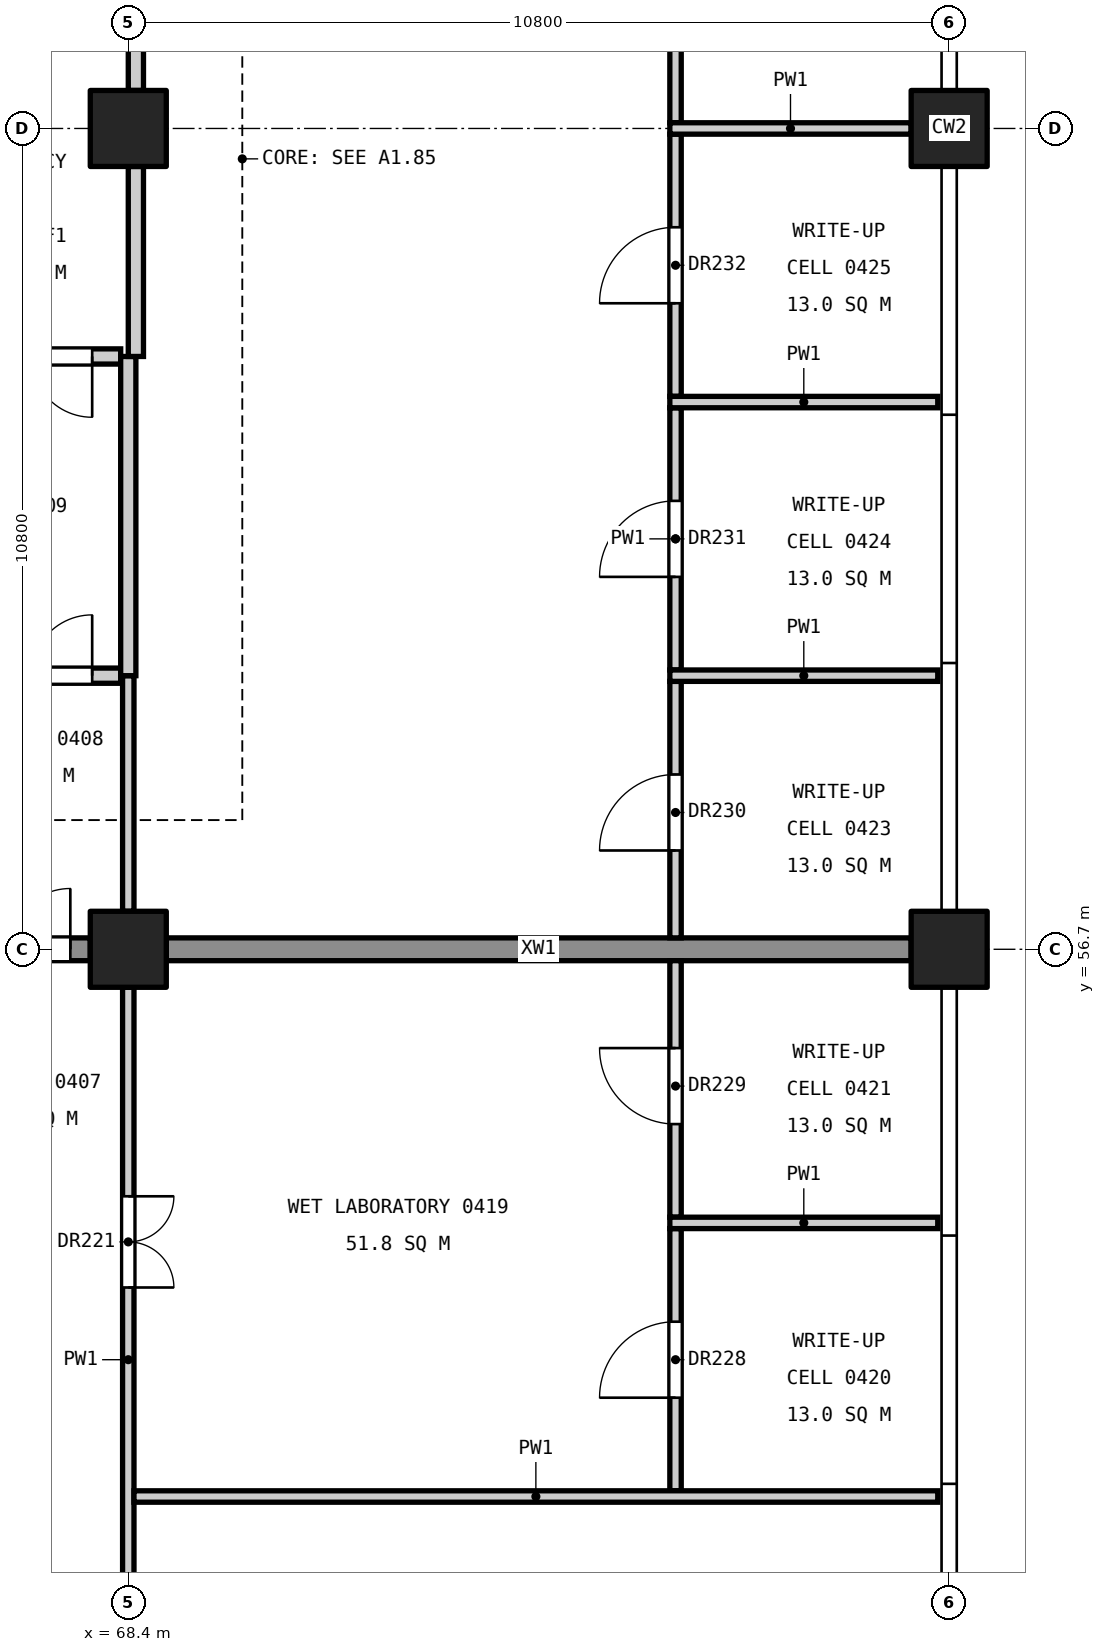
"""IFC4 building model, lengths in metres.
Left out: names, types, materials, properties, quantities, classifications, styles, units other than length and angle.
Written with IfcOpenShell. Run it as: python <this file> out.ifc"""

import sys

from ifc_helpers import new_model, si_unit, direction, frame, frame_2d, origin, origin_2d, place, context, subcontext, project, spatial, rectangle, extrude, element, fill, save


model = new_model("IFC4")
c1 = context("Model", 3, precision=1e-05, world=origin(), true_north=direction((0.0, 1.0)))
c2 = subcontext(c1, "Body", "Model", "MODEL_VIEW")
j1 = project(units=[si_unit("LENGTHUNIT", "METRE"), si_unit("PLANEANGLEUNIT", "RADIAN")], contexts=[c1])
p1 = place(None, origin())
s1 = spatial("IfcSite", under=j1, at=p1, CompositionType="ELEMENT")
p2 = place(p1, origin())
s2 = spatial("IfcBuilding", under=s1, at=p2, CompositionType="ELEMENT")
p3 = place(p2, frame((0.0, 0.0, 22.2)))
s3 = spatial("IfcBuildingStorey", under=s2, at=p3, CompositionType="ELEMENT", Elevation=22.2)
for number, where, z_axis, x_axis in (
    (1, (68.4, 56.7, 0.0), (0.0, 0.0, 1.0), (1.0, 0.0, 0.0)),
    (2, (68.4, 67.5, 0.0), (0.0, 0.0, 1.0), (1.0, 0.0, 0.0)),
    (3, (79.2, 56.7, 0.0), (0.0, 0.0, 1.0), (1.0, 0.0, 0.0)),
    (4, (79.2, 67.5, 0.0), (0.0, 0.0, 1.0), (1.0, 0.0, 0.0)),
):
    element("IfcColumn", number, at=place(p3, frame(where, z_axis=z_axis, x_axis=x_axis)), inside=s3, PredefinedType="COLUMN", context=c2, shape_type="SweptSolid", body=[
        extrude(rectangle(XDim=1.0, YDim=1.0, at=origin_2d()), origin(), (0.0, 0.0, 1.0), 4.8),
    ])
p4 = place(p3, frame((61.7, 56.7, 0.0), z_axis=(0.0, 0.0, 1.0), x_axis=(1.0, 0.0, 0.0)))
e5 = element("IfcWall", 5, at=p4, inside=s3, PredefinedType="SHEAR", context=c2, shape_type="SweptSolid", body=[
    extrude(rectangle(XDim=6.2, YDim=0.3, at=frame_2d((3.1, 0.0))), origin(), (0.0, 0.0, 1.0), 4.55),
])
p5 = place(p4, frame((4.337, 0.0, 0.0)))
e6 = element("IfcOpeningElement", 6, at=p5, cuts=e5, PredefinedType="OPENING", context=c2, shape_type="SweptSolid", body=[
    extrude(rectangle(XDim=1.6, YDim=2.1, at=frame_2d((0.8, 1.05))), frame((0.0, 0.16, 0.0), z_axis=(0.0, -1.0, 0.0), x_axis=(1.0, 0.0, 0.0)), (0.0, 0.0, 1.0), 0.32),
])
p6 = place(p3, frame((68.9, 56.7, 0.0), z_axis=(0.0, 0.0, 1.0), x_axis=(1.0, 0.0, 0.0)))
e7 = element("IfcWall", 7, at=p6, inside=s3, PredefinedType="SHEAR", context=c2, shape_type="SweptSolid", body=[
    extrude(rectangle(XDim=9.8, YDim=0.3, at=frame_2d((4.9, 0.0))), origin(), (0.0, 0.0, 1.0), 4.55),
])
p7 = place(p3, frame((65.95, 60.3, 0.0), z_axis=(0.0, 0.0, 1.0), x_axis=(1.0, 0.0, 0.0)))
e8 = element("IfcWall", 8, at=p7, inside=s3, PredefinedType="PARTITIONING", context=c2, shape_type="SweptSolid", body=[
    extrude(rectangle(XDim=2.35, YDim=0.2, at=frame_2d((1.175, 0.0))), origin(), (0.0, 0.0, 1.0), 3.85),
])
p8 = place(p7, frame((0.375, 0.0, 0.0)))
e9 = element("IfcOpeningElement", 9, at=p8, cuts=e8, PredefinedType="OPENING", context=c2, shape_type="SweptSolid", body=[
    extrude(rectangle(XDim=1.6, YDim=2.1, at=frame_2d((0.8, 1.05))), frame((0.0, 0.11, 0.0), z_axis=(0.0, -1.0, 0.0), x_axis=(1.0, 0.0, 0.0)), (0.0, 0.0, 1.0), 0.22),
])
p9 = place(p3, frame((65.95, 64.5, 0.0), z_axis=(0.0, 0.0, 1.0), x_axis=(1.0, 0.0, 0.0)))
e10 = element("IfcWall", 10, at=p9, inside=s3, PredefinedType="PARTITIONING", context=c2, shape_type="SweptSolid", body=[
    extrude(rectangle(XDim=2.35, YDim=0.2, at=frame_2d((1.175, 0.0))), origin(), (0.0, 0.0, 1.0), 3.55),
])
p10 = place(p9, frame((0.375, 0.0, 0.0)))
e11 = element("IfcOpeningElement", 11, at=p10, cuts=e10, PredefinedType="OPENING", context=c2, shape_type="SweptSolid", body=[
    extrude(rectangle(XDim=1.6, YDim=2.1, at=frame_2d((0.8, 1.05))), frame((0.0, 0.11, 0.0), z_axis=(0.0, -1.0, 0.0), x_axis=(1.0, 0.0, 0.0)), (0.0, 0.0, 1.0), 0.22),
])
p11 = place(p3, frame((68.4, 46.4, 0.0), z_axis=(0.0, 0.0, 1.0), x_axis=(0.0, 1.0, 0.0)))
e12 = element("IfcWall", 12, at=p11, inside=s3, PredefinedType="PARTITIONING", context=c2, shape_type="SweptSolid", body=[
    extrude(rectangle(XDim=9.8, YDim=0.15, at=frame_2d((4.9, 0.0))), origin(), (0.0, 0.0, 1.0), 3.55),
])
p12 = place(p11, frame((1.05, 0.0, 0.0)))
e13 = element("IfcOpeningElement", 13, at=p12, cuts=e12, PredefinedType="OPENING", context=c2, shape_type="SweptSolid", body=[
    extrude(rectangle(XDim=1.0, YDim=2.1, at=frame_2d((0.5, 1.05))), frame((0.0, 0.085, 0.0), z_axis=(0.0, -1.0, 0.0), x_axis=(1.0, 0.0, 0.0)), (0.0, 0.0, 1.0), 0.17),
])
p13 = place(p11, frame((5.85, 0.0, 0.0)))
e14 = element("IfcOpeningElement", 14, at=p13, cuts=e12, PredefinedType="OPENING", context=c2, shape_type="SweptSolid", body=[
    extrude(rectangle(XDim=1.2, YDim=2.1, at=frame_2d((0.6, 1.05))), frame((0.0, 0.085, 0.0), z_axis=(0.0, -1.0, 0.0), x_axis=(1.0, 0.0, 0.0)), (0.0, 0.0, 1.0), 0.17),
])
p14 = place(p3, frame((68.4, 57.2, 0.0), z_axis=(0.0, 0.0, 1.0), x_axis=(0.0, 1.0, 0.0)))
e15 = element("IfcWall", 15, at=p14, inside=s3, PredefinedType="PARTITIONING", context=c2, shape_type="SweptSolid", body=[
    extrude(rectangle(XDim=3.1, YDim=0.15, at=frame_2d((1.55, 0.0))), origin(), (0.0, 0.0, 1.0), 3.55),
])
p15 = place(p3, frame((68.4, 60.3, 0.0), z_axis=(0.0, 0.0, 1.0), x_axis=(0.0, 1.0, 0.0)))
e16 = element("IfcWall", 16, at=p15, inside=s3, PredefinedType="PARTITIONING", context=c2, shape_type="SweptSolid", body=[
    extrude(rectangle(XDim=4.2, YDim=0.2, at=frame_2d((2.1, 0.0))), origin(), (0.0, 0.0, 1.0), 3.55),
])
p16 = place(p3, frame((68.5, 64.5, 0.0), z_axis=(0.0, 0.0, 1.0), x_axis=(0.0, 1.0, 0.0)))
e17 = element("IfcWall", 17, at=p16, inside=s3, PredefinedType="PARTITIONING", context=c2, shape_type="SweptSolid", body=[
    extrude(rectangle(XDim=2.5, YDim=0.2, at=frame_2d((1.25, 0.0))), origin(), (0.0, 0.0, 1.0), 3.55),
])
p17 = place(p3, frame((68.5, 68.0, 0.0), z_axis=(0.0, 0.0, 1.0), x_axis=(0.0, 1.0, 0.0)))
e18 = element("IfcWall", 18, at=p17, inside=s3, PredefinedType="PARTITIONING", context=c2, shape_type="SweptSolid", body=[
    extrude(rectangle(XDim=2.8, YDim=0.2, at=frame_2d((1.4, 0.0))), origin(), (0.0, 0.0, 1.0), 3.55),
])
p18 = place(p3, frame((75.6, 49.575, 0.0), z_axis=(0.0, 0.0, 1.0), x_axis=(0.0, 1.0, 0.0)))
e19 = element("IfcWall", 19, at=p18, inside=s3, PredefinedType="PARTITIONING", context=c2, shape_type="SweptSolid", body=[
    extrude(rectangle(XDim=3.45, YDim=0.15, at=frame_2d((1.725, 0.0))), origin(), (0.0, 0.0, 1.0), 3.55),
])
p19 = place(p18, frame((1.225, 0.0, 0.0)))
e20 = element("IfcOpeningElement", 20, at=p19, cuts=e19, PredefinedType="OPENING", context=c2, shape_type="SweptSolid", body=[
    extrude(rectangle(XDim=1.0, YDim=2.1, at=frame_2d((0.5, 1.05))), frame((0.0, 0.085, 0.0), z_axis=(0.0, -1.0, 0.0), x_axis=(1.0, 0.0, 0.0)), (0.0, 0.0, 1.0), 0.17),
])
p20 = place(p3, frame((75.6, 53.175, 0.0), z_axis=(0.0, 0.0, 1.0), x_axis=(0.0, 1.0, 0.0)))
e21 = element("IfcWall", 21, at=p20, inside=s3, PredefinedType="PARTITIONING", context=c2, shape_type="SweptSolid", body=[
    extrude(rectangle(XDim=3.375, YDim=0.15, at=frame_2d((1.688, 0.0))), origin(), (0.0, 0.0, 1.0), 3.55),
])
p21 = place(p20, frame((1.225, 0.0, 0.0)))
e22 = element("IfcOpeningElement", 22, at=p21, cuts=e21, PredefinedType="OPENING", context=c2, shape_type="SweptSolid", body=[
    extrude(rectangle(XDim=1.0, YDim=2.1, at=frame_2d((0.5, 1.05))), frame((0.0, 0.085, 0.0), z_axis=(0.0, -1.0, 0.0), x_axis=(1.0, 0.0, 0.0)), (0.0, 0.0, 1.0), 0.17),
])
p22 = place(p3, frame((75.525, 53.1, 0.0), z_axis=(0.0, 0.0, 1.0), x_axis=(1.0, 0.0, 0.0)))
e23 = element("IfcWall", 23, at=p22, inside=s3, PredefinedType="PARTITIONING", context=c2, shape_type="SweptSolid", body=[
    extrude(rectangle(XDim=3.525, YDim=0.15, at=frame_2d((1.763, 0.0))), origin(), (0.0, 0.0, 1.0), 3.85),
])
p23 = place(p3, frame((75.6, 56.85, 0.0), z_axis=(0.0, 0.0, 1.0), x_axis=(0.0, 1.0, 0.0)))
e24 = element("IfcWall", 24, at=p23, inside=s3, PredefinedType="PARTITIONING", context=c2, shape_type="SweptSolid", body=[
    extrude(rectangle(XDim=3.375, YDim=0.15, at=frame_2d((1.688, 0.0))), origin(), (0.0, 0.0, 1.0), 3.55),
])
p24 = place(p23, frame((1.15, 0.0, 0.0)))
e25 = element("IfcOpeningElement", 25, at=p24, cuts=e24, PredefinedType="OPENING", context=c2, shape_type="SweptSolid", body=[
    extrude(rectangle(XDim=1.0, YDim=2.1, at=frame_2d((0.5, 1.05))), frame((0.0, 0.085, 0.0), z_axis=(0.0, -1.0, 0.0), x_axis=(1.0, 0.0, 0.0)), (0.0, 0.0, 1.0), 0.17),
])
p25 = place(p3, frame((75.6, 60.375, 0.0), z_axis=(0.0, 0.0, 1.0), x_axis=(0.0, 1.0, 0.0)))
e26 = element("IfcWall", 26, at=p25, inside=s3, PredefinedType="PARTITIONING", context=c2, shape_type="SweptSolid", body=[
    extrude(rectangle(XDim=3.45, YDim=0.15, at=frame_2d((1.725, 0.0))), origin(), (0.0, 0.0, 1.0), 3.55),
])
p26 = place(p25, frame((1.225, 0.0, 0.0)))
e27 = element("IfcOpeningElement", 27, at=p26, cuts=e26, PredefinedType="OPENING", context=c2, shape_type="SweptSolid", body=[
    extrude(rectangle(XDim=1.0, YDim=2.1, at=frame_2d((0.5, 1.05))), frame((0.0, 0.085, 0.0), z_axis=(0.0, -1.0, 0.0), x_axis=(1.0, 0.0, 0.0)), (0.0, 0.0, 1.0), 0.17),
])
p27 = place(p3, frame((75.6, 63.975, 0.0), z_axis=(0.0, 0.0, 1.0), x_axis=(0.0, 1.0, 0.0)))
e28 = element("IfcWall", 28, at=p27, inside=s3, PredefinedType="PARTITIONING", context=c2, shape_type="SweptSolid", body=[
    extrude(rectangle(XDim=3.45, YDim=0.15, at=frame_2d((1.725, 0.0))), origin(), (0.0, 0.0, 1.0), 3.55),
])
p28 = place(p27, frame((1.225, 0.0, 0.0)))
e29 = element("IfcOpeningElement", 29, at=p28, cuts=e28, PredefinedType="OPENING", context=c2, shape_type="SweptSolid", body=[
    extrude(rectangle(XDim=1.0, YDim=2.1, at=frame_2d((0.5, 1.05))), frame((0.0, 0.085, 0.0), z_axis=(0.0, -1.0, 0.0), x_axis=(1.0, 0.0, 0.0)), (0.0, 0.0, 1.0), 0.17),
])
p29 = place(p3, frame((75.6, 67.575, 0.0), z_axis=(0.0, 0.0, 1.0), x_axis=(0.0, 1.0, 0.0)))
e30 = element("IfcWall", 30, at=p29, inside=s3, PredefinedType="PARTITIONING", context=c2, shape_type="SweptSolid", body=[
    extrude(rectangle(XDim=3.45, YDim=0.15, at=frame_2d((1.725, 0.0))), origin(), (0.0, 0.0, 1.0), 3.55),
])
p30 = place(p29, frame((1.225, 0.0, 0.0)))
e31 = element("IfcOpeningElement", 31, at=p30, cuts=e30, PredefinedType="OPENING", context=c2, shape_type="SweptSolid", body=[
    extrude(rectangle(XDim=1.0, YDim=2.1, at=frame_2d((0.5, 1.05))), frame((0.0, 0.085, 0.0), z_axis=(0.0, -1.0, 0.0), x_axis=(1.0, 0.0, 0.0)), (0.0, 0.0, 1.0), 0.17),
])
for number, where, z_axis, x_axis in (
    (32, (75.525, 60.3, 0.0), (0.0, 0.0, 1.0), (1.0, 0.0, 0.0)),
    (33, (75.525, 63.9, 0.0), (0.0, 0.0, 1.0), (1.0, 0.0, 0.0)),
):
    element("IfcWall", number, at=place(p3, frame(where, z_axis=z_axis, x_axis=x_axis)), inside=s3, PredefinedType="PARTITIONING", context=c2, shape_type="SweptSolid", body=[
        extrude(rectangle(XDim=3.525, YDim=0.15, at=frame_2d((1.763, 0.0))), origin(), (0.0, 0.0, 1.0), 3.85),
    ])
p31 = place(p3, frame((75.525, 67.5, 0.0), z_axis=(0.0, 0.0, 1.0), x_axis=(1.0, 0.0, 0.0)))
e34 = element("IfcWall", 34, at=p31, inside=s3, PredefinedType="PARTITIONING", context=c2, shape_type="SweptSolid", body=[
    extrude(rectangle(XDim=3.175, YDim=0.15, at=frame_2d((1.587, 0.0))), origin(), (0.0, 0.0, 1.0), 3.85),
])
p32 = place(p3, frame((68.475, 49.5, 0.0), z_axis=(0.0, 0.0, 1.0), x_axis=(1.0, 0.0, 0.0)))
e35 = element("IfcWall", 35, at=p32, inside=s3, PredefinedType="PARTITIONING", context=c2, shape_type="SweptSolid", body=[
    extrude(rectangle(XDim=10.575, YDim=0.15, at=frame_2d((5.288, 0.0))), origin(), (0.0, 0.0, 1.0), 3.85),
])
p33 = place(p13, frame((1.2, 0.0, 0.0), z_axis=(0.0, 0.0, 1.0), x_axis=(-1.0, 0.0, 0.0)))
e36 = element("IfcDoor", 36, at=p33, inside=s3, OperationType="DOUBLE_DOOR_SINGLE_SWING", PredefinedType="DOOR", context=c2, shape_type="SweptSolid", body=[
    extrude(rectangle(XDim=1.2, YDim=2.1, at=frame_2d((0.6, 1.05))), frame((0.0, 0.025, 0.0), z_axis=(0.0, -1.0, 0.0), x_axis=(1.0, 0.0, 0.0)), (0.0, 0.0, 1.0), 0.05),
])
fill(e14, e36)
p34 = place(p19, origin())
e37 = element("IfcDoor", 37, at=p34, inside=s3, OperationType="SINGLE_SWING_LEFT", PredefinedType="DOOR", context=c2, shape_type="SweptSolid", body=[
    extrude(rectangle(XDim=1.0, YDim=2.1, at=frame_2d((0.5, 1.05))), frame((0.0, 0.025, 0.0), z_axis=(0.0, -1.0, 0.0), x_axis=(1.0, 0.0, 0.0)), (0.0, 0.0, 1.0), 0.05),
])
fill(e20, e37)
p35 = place(p21, origin())
e38 = element("IfcDoor", 38, at=p35, inside=s3, OperationType="SINGLE_SWING_RIGHT", PredefinedType="DOOR", context=c2, shape_type="SweptSolid", body=[
    extrude(rectangle(XDim=1.0, YDim=2.1, at=frame_2d((0.5, 1.05))), frame((0.0, 0.025, 0.0), z_axis=(0.0, -1.0, 0.0), x_axis=(1.0, 0.0, 0.0)), (0.0, 0.0, 1.0), 0.05),
])
fill(e22, e38)
p36 = place(p24, origin())
e39 = element("IfcDoor", 39, at=p36, inside=s3, OperationType="SINGLE_SWING_LEFT", PredefinedType="DOOR", context=c2, shape_type="SweptSolid", body=[
    extrude(rectangle(XDim=1.0, YDim=2.1, at=frame_2d((0.5, 1.05))), frame((0.0, 0.025, 0.0), z_axis=(0.0, -1.0, 0.0), x_axis=(1.0, 0.0, 0.0)), (0.0, 0.0, 1.0), 0.05),
])
fill(e25, e39)
p37 = place(p26, origin())
e40 = element("IfcDoor", 40, at=p37, inside=s3, OperationType="SINGLE_SWING_LEFT", PredefinedType="DOOR", context=c2, shape_type="SweptSolid", body=[
    extrude(rectangle(XDim=1.0, YDim=2.1, at=frame_2d((0.5, 1.05))), frame((0.0, 0.025, 0.0), z_axis=(0.0, -1.0, 0.0), x_axis=(1.0, 0.0, 0.0)), (0.0, 0.0, 1.0), 0.05),
])
fill(e27, e40)
p38 = place(p28, origin())
e41 = element("IfcDoor", 41, at=p38, inside=s3, OperationType="SINGLE_SWING_LEFT", PredefinedType="DOOR", context=c2, shape_type="SweptSolid", body=[
    extrude(rectangle(XDim=1.0, YDim=2.1, at=frame_2d((0.5, 1.05))), frame((0.0, 0.025, 0.0), z_axis=(0.0, -1.0, 0.0), x_axis=(1.0, 0.0, 0.0)), (0.0, 0.0, 1.0), 0.05),
])
fill(e29, e41)
p39 = place(p8, origin())
e42 = element("IfcDoor", 42, at=p39, inside=s3, OperationType="DOUBLE_DOOR_SINGLE_SWING", PredefinedType="DOOR", context=c2, shape_type="SweptSolid", body=[
    extrude(rectangle(XDim=1.6, YDim=2.1, at=frame_2d((0.8, 1.05))), frame((0.0, 0.025, 0.0), z_axis=(0.0, -1.0, 0.0), x_axis=(1.0, 0.0, 0.0)), (0.0, 0.0, 1.0), 0.05),
])
fill(e9, e42)
p40 = place(p10, frame((1.6, 0.0, 0.0), z_axis=(0.0, 0.0, 1.0), x_axis=(-1.0, 0.0, 0.0)))
e43 = element("IfcDoor", 43, at=p40, inside=s3, OperationType="DOUBLE_DOOR_SINGLE_SWING", PredefinedType="DOOR", context=c2, shape_type="SweptSolid", body=[
    extrude(rectangle(XDim=1.6, YDim=2.1, at=frame_2d((0.8, 1.05))), frame((0.0, 0.025, 0.0), z_axis=(0.0, -1.0, 0.0), x_axis=(1.0, 0.0, 0.0)), (0.0, 0.0, 1.0), 0.05),
])
fill(e11, e43)
p41 = place(p5, origin())
e44 = element("IfcDoor", 44, at=p41, inside=s3, OperationType="DOUBLE_DOOR_SINGLE_SWING", PredefinedType="DOOR", context=c2, shape_type="SweptSolid", body=[
    extrude(rectangle(XDim=1.6, YDim=2.1, at=frame_2d((0.8, 1.05))), frame((0.0, 0.025, 0.0), z_axis=(0.0, -1.0, 0.0), x_axis=(1.0, 0.0, 0.0)), (0.0, 0.0, 1.0), 0.05),
])
fill(e6, e44)
save(model, sys.argv[1])
